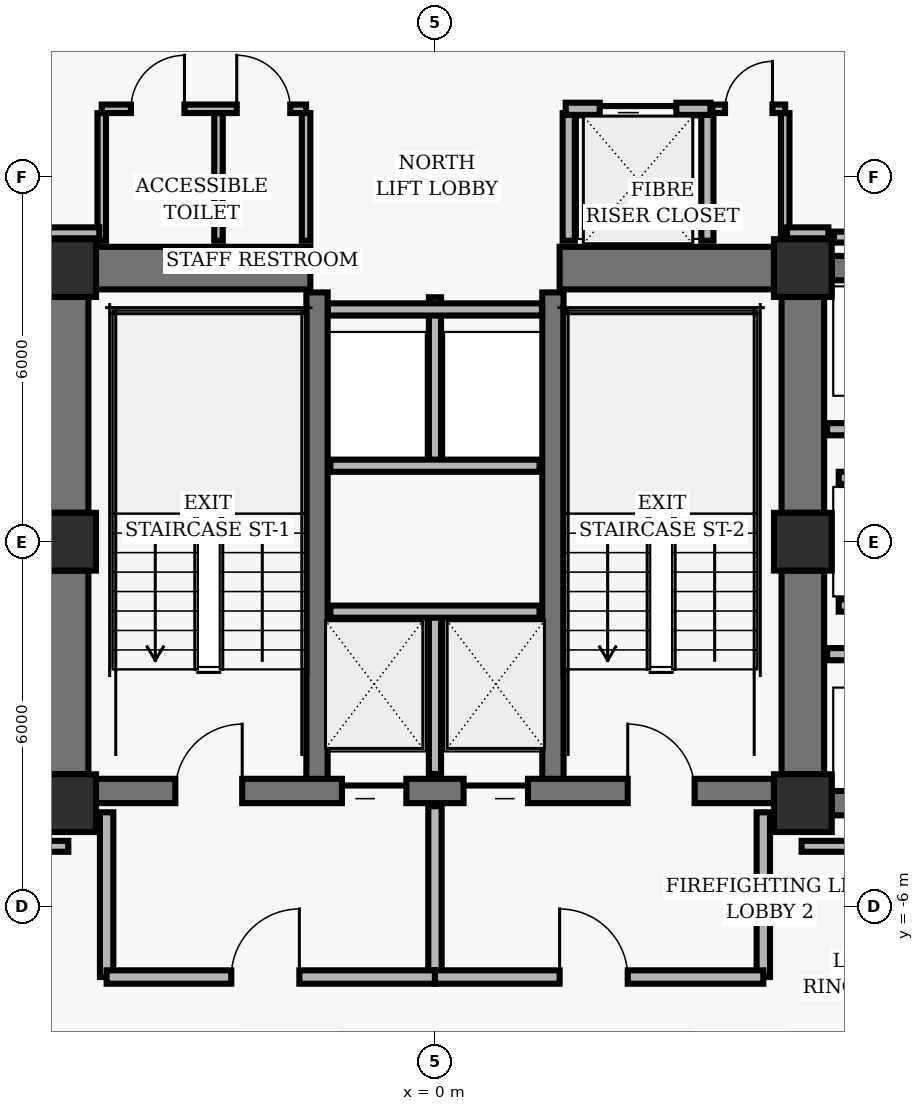
"""IFC4 building model, lengths in metres.
Left out: names, types, materials, properties, quantities, classifications, styles, units other than length and angle.
Written with IfcOpenShell. Run it as: python <this file> out.ifc"""

import sys

from ifc_helpers import new_model, si_unit, direction, frame, frame_2d, origin, origin_2d, place, context, subcontext, project, spatial, rectangle, hollow_rectangle, extrude, element, fill, save


model = new_model("IFC4")
c1 = context("Model", 3, precision=1e-05, world=origin(), true_north=direction((0.0, 1.0)))
c2 = subcontext(c1, "Body", "Model", "MODEL_VIEW")
j1 = project(units=[si_unit("LENGTHUNIT", "METRE"), si_unit("PLANEANGLEUNIT", "RADIAN")], contexts=[c1])
p1 = place(None, origin())
s1 = spatial("IfcSite", under=j1, at=p1, CompositionType="ELEMENT")
p2 = place(p1, origin())
s2 = spatial("IfcBuilding", under=s1, at=p2, CompositionType="ELEMENT")
p3 = place(p2, frame((0.0, 0.0, 94.72)))
s3 = spatial("IfcBuildingStorey", under=s2, at=p3, CompositionType="ELEMENT", Elevation=94.72)
for number, where, z_axis, x_axis in (
    (1, (-6.05, 4.5, 0.0), (0.0, 0.0, 1.0), (1.0, 0.0, 0.0)),
    (2, (6.05, 4.5, 0.0), (0.0, 0.0, 1.0), (1.0, 0.0, 0.0)),
    (3, (-6.05, 0.0, 0.0), (0.0, 0.0, 1.0), (1.0, 0.0, 0.0)),
    (4, (6.05, 0.0, 0.0), (0.0, 0.0, 1.0), (1.0, 0.0, 0.0)),
    (5, (-6.05, -4.3, 0.0), (0.0, 0.0, 1.0), (1.0, 0.0, 0.0)),
    (6, (6.05, -4.3, 0.0), (0.0, 0.0, 1.0), (1.0, 0.0, 0.0)),
):
    element("IfcColumn", number, at=place(p3, frame(where, z_axis=z_axis, x_axis=x_axis)), inside=s3, PredefinedType="COLUMN", context=c2, shape_type="SweptSolid", body=[
        extrude(hollow_rectangle(XDim=0.95, YDim=0.95, WallThickness=0.06, InnerFilletRadius=0.02, OuterFilletRadius=0.04, at=origin_2d()), origin(), (0.0, 0.0, 1.0), 3.04),
    ])
p4 = place(p3, frame((-6.05, 0.475, 0.0), z_axis=(0.0, 0.0, 1.0), x_axis=(0.0, 1.0, 0.0)))
e7 = element("IfcWall", 7, at=p4, inside=s3, PredefinedType="SHEAR", context=c2, shape_type="SweptSolid", body=[
    extrude(rectangle(XDim=3.55, YDim=0.7, at=frame_2d((1.775, 0.0))), origin(), (0.0, 0.0, 1.0), 2.788),
])
p5 = place(p3, frame((-6.05, -3.825, 0.0), z_axis=(0.0, 0.0, 1.0), x_axis=(0.0, 1.0, 0.0)))
e8 = element("IfcWall", 8, at=p5, inside=s3, PredefinedType="SHEAR", context=c2, shape_type="SweptSolid", body=[
    extrude(rectangle(XDim=3.35, YDim=0.7, at=frame_2d((1.675, 0.0))), origin(), (0.0, 0.0, 1.0), 2.788),
])
p6 = place(p3, frame((6.05, 0.475, 0.0), z_axis=(0.0, 0.0, 1.0), x_axis=(0.0, 1.0, 0.0)))
e9 = element("IfcWall", 9, at=p6, inside=s3, PredefinedType="SHEAR", context=c2, shape_type="SweptSolid", body=[
    extrude(rectangle(XDim=3.55, YDim=0.7, at=frame_2d((1.775, 0.0))), origin(), (0.0, 0.0, 1.0), 2.788),
])
p7 = place(p3, frame((6.05, -3.825, 0.0), z_axis=(0.0, 0.0, 1.0), x_axis=(0.0, 1.0, 0.0)))
e10 = element("IfcWall", 10, at=p7, inside=s3, PredefinedType="SHEAR", context=c2, shape_type="SweptSolid", body=[
    extrude(rectangle(XDim=3.35, YDim=0.7, at=frame_2d((1.675, 0.0))), origin(), (0.0, 0.0, 1.0), 2.788),
])
for number, where, z_axis, x_axis in (
    (11, (-1.94, -4.1, 0.0), (0.0, 0.0, 1.0), (0.0, 1.0, 0.0)),
    (12, (1.94, -4.1, 0.0), (0.0, 0.0, 1.0), (0.0, 1.0, 0.0)),
):
    element("IfcWall", number, at=place(p3, frame(where, z_axis=z_axis, x_axis=x_axis)), inside=s3, PredefinedType="SHEAR", context=c2, shape_type="SweptSolid", body=[
        extrude(rectangle(XDim=8.2, YDim=0.35, at=frame_2d((4.1, 0.0))), origin(), (0.0, 0.0, 1.0), 2.788),
    ])
p8 = place(p3, frame((-5.575, -4.1, 0.0), z_axis=(0.0, 0.0, 1.0), x_axis=(1.0, 0.0, 0.0)))
e13 = element("IfcWall", 13, at=p8, inside=s3, PredefinedType="SHEAR", context=c2, shape_type="SweptSolid", body=[
    extrude(rectangle(XDim=11.15, YDim=0.4, at=frame_2d((5.575, 0.0))), origin(), (0.0, 0.0, 1.0), 2.788),
])
p9 = place(p8, frame((1.305, 0.0, 0.0)))
e14 = element("IfcOpeningElement", 14, at=p9, cuts=e13, PredefinedType="OPENING", context=c2, shape_type="SweptSolid", body=[
    extrude(rectangle(XDim=1.1, YDim=2.04, at=frame_2d((0.55, 1.02))), frame((0.0, 0.21, 0.0), z_axis=(0.0, -1.0, 0.0), x_axis=(1.0, 0.0, 0.0)), (0.0, 0.0, 1.0), 0.42),
])
p10 = place(p8, frame((8.745, 0.0, 0.0)))
e15 = element("IfcOpeningElement", 15, at=p10, cuts=e13, PredefinedType="OPENING", context=c2, shape_type="SweptSolid", body=[
    extrude(rectangle(XDim=1.1, YDim=2.04, at=frame_2d((0.55, 1.02))), frame((0.0, 0.21, 0.0), z_axis=(0.0, -1.0, 0.0), x_axis=(1.0, 0.0, 0.0)), (0.0, 0.0, 1.0), 0.42),
])
p11 = place(p8, frame((4.045, 0.0, 0.0)))
e16 = element("IfcOpeningElement", 16, at=p11, cuts=e13, PredefinedType="OPENING", context=c2, shape_type="SweptSolid", body=[
    extrude(rectangle(XDim=1.06, YDim=2.04, at=frame_2d((0.53, 1.02))), frame((0.0, 0.21, 0.0), z_axis=(0.0, -1.0, 0.0), x_axis=(1.0, 0.0, 0.0)), (0.0, 0.0, 1.0), 0.42),
])
p12 = place(p8, frame((6.045, 0.0, 0.0)))
e17 = element("IfcOpeningElement", 17, at=p12, cuts=e13, PredefinedType="OPENING", context=c2, shape_type="SweptSolid", body=[
    extrude(rectangle(XDim=1.06, YDim=2.04, at=frame_2d((0.53, 1.02))), frame((0.0, 0.21, 0.0), z_axis=(0.0, -1.0, 0.0), x_axis=(1.0, 0.0, 0.0)), (0.0, 0.0, 1.0), 0.42),
])
for number, where, z_axis, x_axis in (
    (18, (-5.575, 4.5, 0.0), (0.0, 0.0, 1.0), (1.0, 0.0, 0.0)),
    (19, (2.05, 4.5, 0.0), (0.0, 0.0, 1.0), (1.0, 0.0, 0.0)),
):
    element("IfcWall", number, at=place(p3, frame(where, z_axis=z_axis, x_axis=x_axis)), inside=s3, PredefinedType="SHEAR", context=c2, shape_type="SweptSolid", body=[
        extrude(rectangle(XDim=3.525, YDim=0.7, at=frame_2d((1.762, 0.0))), origin(), (0.0, 0.0, 1.0), 2.788),
    ])
for number, where, z_axis, x_axis in (
    (20, (6.525, 4.5, 0.0), (0.0, 0.0, 1.0), (1.0, 0.0, 0.0)),
    (21, (6.525, -4.3, 0.0), (0.0, 0.0, 1.0), (1.0, 0.0, 0.0)),
):
    element("IfcWall", number, at=place(p3, frame(where, z_axis=z_axis, x_axis=x_axis)), inside=s3, PredefinedType="SHEAR", context=c2, shape_type="SweptSolid", body=[
        extrude(rectangle(XDim=1.95, YDim=0.4, at=frame_2d((0.975, 0.0))), origin(), (0.0, 0.0, 1.0), 2.788),
    ])
p13 = place(p3, frame((0.0, -3.82, 0.0), z_axis=(0.0, 0.0, 1.0), x_axis=(0.0, 1.0, 0.0)))
e22 = element("IfcWall", 22, at=p13, inside=s3, PredefinedType="PARTITIONING", context=c2, shape_type="SweptSolid", body=[
    extrude(rectangle(XDim=2.67, YDim=0.2, at=frame_2d((1.335, 0.0))), origin(), (0.0, 0.0, 1.0), 2.763),
])
p14 = place(p3, frame((-1.72, -1.15, 0.0), z_axis=(0.0, 0.0, 1.0), x_axis=(1.0, 0.0, 0.0)))
e23 = element("IfcWall", 23, at=p14, inside=s3, PredefinedType="PARTITIONING", context=c2, shape_type="SweptSolid", body=[
    extrude(rectangle(XDim=3.44, YDim=0.2, at=frame_2d((1.72, 0.0))), origin(), (0.0, 0.0, 1.0), 2.763),
])
for number, where, z_axis, x_axis in (
    (24, (-5.4, -7.16, 0.0), (0.0, 0.0, 1.0), (0.0, 1.0, 0.0)),
    (25, (5.4, -7.16, 0.0), (0.0, 0.0, 1.0), (0.0, 1.0, 0.0)),
):
    element("IfcWall", number, at=place(p3, frame(where, z_axis=z_axis, x_axis=x_axis)), inside=s3, PredefinedType="PARTITIONING", context=c2, shape_type="SweptSolid", body=[
        extrude(rectangle(XDim=2.71, YDim=0.22, at=frame_2d((1.355, 0.0))), origin(), (0.0, 0.0, 1.0), 2.763),
    ])
p15 = place(p3, frame((0.0, -7.16, 0.0), z_axis=(0.0, 0.0, 1.0), x_axis=(0.0, 1.0, 0.0)))
e26 = element("IfcWall", 26, at=p15, inside=s3, PredefinedType="PARTITIONING", context=c2, shape_type="SweptSolid", body=[
    extrude(rectangle(XDim=2.81, YDim=0.22, at=frame_2d((1.405, 0.0))), origin(), (0.0, 0.0, 1.0), 2.763),
])
p16 = place(p3, frame((-5.4, -7.16, 0.0), z_axis=(0.0, 0.0, 1.0), x_axis=(1.0, 0.0, 0.0)))
e27 = element("IfcWall", 27, at=p16, inside=s3, PredefinedType="PARTITIONING", context=c2, shape_type="SweptSolid", body=[
    extrude(rectangle(XDim=5.4, YDim=0.22, at=frame_2d((2.7, 0.0))), origin(), (0.0, 0.0, 1.0), 2.763),
])
p17 = place(p16, frame((2.05, 0.0, 0.0)))
e28 = element("IfcOpeningElement", 28, at=p17, cuts=e27, PredefinedType="OPENING", context=c2, shape_type="SweptSolid", body=[
    extrude(rectangle(XDim=1.12, YDim=2.02, at=frame_2d((0.56, 1.01))), frame((0.0, 0.12, 0.0), z_axis=(0.0, -1.0, 0.0), x_axis=(1.0, 0.0, 0.0)), (0.0, 0.0, 1.0), 0.24),
])
p18 = place(p3, frame((0.0, -7.16, 0.0), z_axis=(0.0, 0.0, 1.0), x_axis=(1.0, 0.0, 0.0)))
e29 = element("IfcWall", 29, at=p18, inside=s3, PredefinedType="PARTITIONING", context=c2, shape_type="SweptSolid", body=[
    extrude(rectangle(XDim=5.4, YDim=0.22, at=frame_2d((2.7, 0.0))), origin(), (0.0, 0.0, 1.0), 2.763),
])
p19 = place(p18, frame((2.05, 0.0, 0.0)))
e30 = element("IfcOpeningElement", 30, at=p19, cuts=e29, PredefinedType="OPENING", context=c2, shape_type="SweptSolid", body=[
    extrude(rectangle(XDim=1.12, YDim=2.02, at=frame_2d((0.56, 1.01))), frame((0.0, 0.12, 0.0), z_axis=(0.0, -1.0, 0.0), x_axis=(1.0, 0.0, 0.0)), (0.0, 0.0, 1.0), 0.24),
])
p20 = place(p3, frame((0.0, 1.25, 0.0), z_axis=(0.0, 0.0, 1.0), x_axis=(0.0, 1.0, 0.0)))
e31 = element("IfcWall", 31, at=p20, inside=s3, PredefinedType="PARTITIONING", context=c2, shape_type="SweptSolid", body=[
    extrude(rectangle(XDim=2.77, YDim=0.2, at=frame_2d((1.385, 0.0))), origin(), (0.0, 0.0, 1.0), 2.763),
])
p21 = place(p3, frame((-1.72, 1.25, 0.0), z_axis=(0.0, 0.0, 1.0), x_axis=(1.0, 0.0, 0.0)))
e32 = element("IfcWall", 32, at=p21, inside=s3, PredefinedType="PARTITIONING", context=c2, shape_type="SweptSolid", body=[
    extrude(rectangle(XDim=3.44, YDim=0.2, at=frame_2d((1.72, 0.0))), origin(), (0.0, 0.0, 1.0), 2.763),
])
p22 = place(p3, frame((-1.76, 3.82, 0.0), z_axis=(0.0, 0.0, 1.0), x_axis=(1.0, 0.0, 0.0)))
e33 = element("IfcWall", 33, at=p22, inside=s3, PredefinedType="PARTITIONING", context=c2, shape_type="SweptSolid", body=[
    extrude(rectangle(XDim=3.52, YDim=0.2, at=frame_2d((1.76, 0.0))), origin(), (0.0, 0.0, 1.0), 2.763),
])
for number, where, z_axis, x_axis in (
    (34, (2.2, 4.95, 0.0), (0.0, 0.0, 1.0), (0.0, 1.0, 0.0)),
    (35, (4.48, 4.95, 0.0), (0.0, 0.0, 1.0), (0.0, 1.0, 0.0)),
):
    element("IfcWall", number, at=place(p3, frame(where, z_axis=z_axis, x_axis=x_axis)), inside=s3, PredefinedType="PARTITIONING", context=c2, shape_type="SweptSolid", body=[
        extrude(rectangle(XDim=2.1, YDim=0.2, at=frame_2d((1.05, 0.0))), origin(), (0.0, 0.0, 1.0), 2.763),
    ])
p23 = place(p3, frame((2.15, 7.12, 0.0), z_axis=(0.0, 0.0, 1.0), x_axis=(1.0, 0.0, 0.0)))
e36 = element("IfcWall", 36, at=p23, inside=s3, PredefinedType="PARTITIONING", context=c2, shape_type="SweptSolid", body=[
    extrude(rectangle(XDim=2.38, YDim=0.2, at=frame_2d((1.19, 0.0))), origin(), (0.0, 0.0, 1.0), 2.763),
])
p24 = place(p23, frame((0.56, 0.0, 0.0)))
e37 = element("IfcOpeningElement", 37, at=p24, cuts=e36, PredefinedType="OPENING", context=c2, shape_type="SweptSolid", body=[
    extrude(rectangle(XDim=1.26, YDim=2.06, at=frame_2d((0.63, 1.03))), frame((0.0, 0.11, 0.0), z_axis=(0.0, -1.0, 0.0), x_axis=(1.0, 0.0, 0.0)), (0.0, 0.0, 1.0), 0.22),
])
for number, where, z_axis, x_axis in (
    (38, (-5.48, 4.95, 0.0), (0.0, 0.0, 1.0), (0.0, 1.0, 0.0)),
    (39, (-3.56, 4.95, 0.0), (0.0, 0.0, 1.0), (0.0, 1.0, 0.0)),
    (40, (-2.12, 4.95, 0.0), (0.0, 0.0, 1.0), (0.0, 1.0, 0.0)),
):
    element("IfcWall", number, at=place(p3, frame(where, z_axis=z_axis, x_axis=x_axis)), inside=s3, PredefinedType="PARTITIONING", context=c2, shape_type="SweptSolid", body=[
        extrude(rectangle(XDim=2.1, YDim=0.14, at=frame_2d((1.05, 0.0))), origin(), (0.0, 0.0, 1.0), 2.763),
    ])
p25 = place(p3, frame((-5.48, 7.12, 0.0), z_axis=(0.0, 0.0, 1.0), x_axis=(1.0, 0.0, 0.0)))
e41 = element("IfcWall", 41, at=p25, inside=s3, PredefinedType="PARTITIONING", context=c2, shape_type="SweptSolid", body=[
    extrude(rectangle(XDim=3.36, YDim=0.14, at=frame_2d((1.68, 0.0))), origin(), (0.0, 0.0, 1.0), 2.763),
])
p26 = place(p25, frame((0.48, 0.0, 0.0)))
e42 = element("IfcOpeningElement", 42, at=p26, cuts=e41, PredefinedType="OPENING", context=c2, shape_type="SweptSolid", body=[
    extrude(rectangle(XDim=0.88, YDim=2.02, at=frame_2d((0.44, 1.01))), frame((0.0, 0.08, 0.0), z_axis=(0.0, -1.0, 0.0), x_axis=(1.0, 0.0, 0.0)), (0.0, 0.0, 1.0), 0.16),
])
p27 = place(p25, frame((2.22, 0.0, 0.0)))
e43 = element("IfcOpeningElement", 43, at=p27, cuts=e41, PredefinedType="OPENING", context=c2, shape_type="SweptSolid", body=[
    extrude(rectangle(XDim=0.88, YDim=2.02, at=frame_2d((0.44, 1.01))), frame((0.0, 0.08, 0.0), z_axis=(0.0, -1.0, 0.0), x_axis=(1.0, 0.0, 0.0)), (0.0, 0.0, 1.0), 0.16),
])
p28 = place(p3, frame((5.76, 4.95, 0.0), z_axis=(0.0, 0.0, 1.0), x_axis=(0.0, 1.0, 0.0)))
e44 = element("IfcWall", 44, at=p28, inside=s3, PredefinedType="PARTITIONING", context=c2, shape_type="SweptSolid", body=[
    extrude(rectangle(XDim=2.1, YDim=0.14, at=frame_2d((1.05, 0.0))), origin(), (0.0, 0.0, 1.0), 2.763),
])
p29 = place(p3, frame((4.56, 7.12, 0.0), z_axis=(0.0, 0.0, 1.0), x_axis=(1.0, 0.0, 0.0)))
e45 = element("IfcWall", 45, at=p29, inside=s3, PredefinedType="PARTITIONING", context=c2, shape_type="SweptSolid", body=[
    extrude(rectangle(XDim=1.2, YDim=0.14, at=frame_2d((0.6, 0.0))), origin(), (0.0, 0.0, 1.0), 2.763),
])
p30 = place(p29, frame((0.21, 0.0, 0.0)))
e46 = element("IfcOpeningElement", 46, at=p30, cuts=e45, PredefinedType="OPENING", context=c2, shape_type="SweptSolid", body=[
    extrude(rectangle(XDim=0.78, YDim=2.01, at=frame_2d((0.39, 1.005))), frame((0.0, 0.08, 0.0), z_axis=(0.0, -1.0, 0.0), x_axis=(1.0, 0.0, 0.0)), (0.0, 0.0, 1.0), 0.16),
])
for number, where, z_axis, x_axis in (
    (47, (6.45, -1.85, 0.0), (0.0, 0.0, 1.0), (1.0, 0.0, 0.0)),
    (48, (6.45, 1.85, 0.0), (0.0, 0.0, 1.0), (1.0, 0.0, 0.0)),
):
    element("IfcWall", number, at=place(p3, frame(where, z_axis=z_axis, x_axis=x_axis)), inside=s3, PredefinedType="PARTITIONING", context=c2, shape_type="SweptSolid", body=[
        extrude(rectangle(XDim=2.1, YDim=0.2, at=frame_2d((1.05, 0.0))), origin(), (0.0, 0.0, 1.0), 2.763),
    ])
for number, where, z_axis, x_axis in (
    (49, (6.64, -1.05, 0.0), (0.0, 0.0, 1.0), (1.0, 0.0, 0.0)),
    (50, (6.64, 1.05, 0.0), (0.0, 0.0, 1.0), (1.0, 0.0, 0.0)),
):
    element("IfcWall", number, at=place(p3, frame(where, z_axis=z_axis, x_axis=x_axis)), inside=s3, PredefinedType="PARTITIONING", context=c2, shape_type="SweptSolid", body=[
        extrude(rectangle(XDim=1.91, YDim=0.2, at=frame_2d((0.955, 0.0))), origin(), (0.0, 0.0, 1.0), 2.763),
    ])
for number, where, z_axis, x_axis in (
    (51, (-9.37, -5.01, 0.0), (0.0, 0.0, 1.0), (1.0, 0.0, 0.0)),
    (52, (6.03, -5.01, 0.0), (0.0, 0.0, 1.0), (1.0, 0.0, 0.0)),
):
    element("IfcWall", number, at=place(p3, frame(where, z_axis=z_axis, x_axis=x_axis)), inside=s3, PredefinedType="PARTITIONING", context=c2, shape_type="SweptSolid", body=[
        extrude(rectangle(XDim=3.34, YDim=0.18, at=frame_2d((1.67, 0.0))), origin(), (0.0, 0.0, 1.0), 2.763),
    ])
p31 = place(p3, frame((9.37, 5.01, 0.0), z_axis=(0.0, 0.0, 1.0), x_axis=(-1.0, 0.0, 0.0)))
e53 = element("IfcWall", 53, at=p31, inside=s3, PredefinedType="PARTITIONING", context=c2, shape_type="SweptSolid", body=[
    extrude(rectangle(XDim=2.808, YDim=0.18, at=frame_2d((1.404, 0.0))), origin(), (0.0, 0.0, 1.0), 2.763),
])
p32 = place(p3, frame((6.47, 5.08, 0.0), z_axis=(0.0, 0.0, 1.0), x_axis=(-1.0, 0.0, 0.0)))
e54 = element("IfcWall", 54, at=p32, inside=s3, PredefinedType="PARTITIONING", context=c2, shape_type="SweptSolid", body=[
    extrude(rectangle(XDim=0.68, YDim=0.18, at=frame_2d((0.34, 0.0))), origin(), (0.0, 0.0, 1.0), 2.763),
])
p33 = place(p3, frame((-5.52, 5.08, 0.0), z_axis=(0.0, 0.0, 1.0), x_axis=(-1.0, 0.0, 0.0)))
e55 = element("IfcWall", 55, at=p33, inside=s3, PredefinedType="PARTITIONING", context=c2, shape_type="SweptSolid", body=[
    extrude(rectangle(XDim=0.95, YDim=0.18, at=frame_2d((0.475, 0.0))), origin(), (0.0, 0.0, 1.0), 2.763),
])
p34 = place(p9, origin())
e56 = element("IfcDoor", 56, at=p34, inside=s3, OperationType="SINGLE_SWING_RIGHT", PredefinedType="DOOR", context=c2, shape_type="SweptSolid", body=[
    extrude(rectangle(XDim=1.1, YDim=2.04, at=frame_2d((0.55, 1.02))), frame((0.0, 0.025, 0.0), z_axis=(0.0, -1.0, 0.0), x_axis=(1.0, 0.0, 0.0)), (0.0, 0.0, 1.0), 0.05),
])
fill(e14, e56)
p35 = place(p10, origin())
e57 = element("IfcDoor", 57, at=p35, inside=s3, OperationType="SINGLE_SWING_LEFT", PredefinedType="DOOR", context=c2, shape_type="SweptSolid", body=[
    extrude(rectangle(XDim=1.1, YDim=2.04, at=frame_2d((0.55, 1.02))), frame((0.0, 0.025, 0.0), z_axis=(0.0, -1.0, 0.0), x_axis=(1.0, 0.0, 0.0)), (0.0, 0.0, 1.0), 0.05),
])
fill(e15, e57)
p36 = place(p11, origin())
e58 = element("IfcDoor", 58, at=p36, inside=s3, OperationType="SLIDING_TO_LEFT", PredefinedType="DOOR", context=c2, shape_type="SweptSolid", body=[
    extrude(rectangle(XDim=1.06, YDim=2.04, at=frame_2d((0.53, 1.02))), frame((0.0, 0.025, 0.0), z_axis=(0.0, -1.0, 0.0), x_axis=(1.0, 0.0, 0.0)), (0.0, 0.0, 1.0), 0.05),
])
fill(e16, e58)
p37 = place(p12, origin())
e59 = element("IfcDoor", 59, at=p37, inside=s3, OperationType="SLIDING_TO_RIGHT", PredefinedType="DOOR", context=c2, shape_type="SweptSolid", body=[
    extrude(rectangle(XDim=1.06, YDim=2.04, at=frame_2d((0.53, 1.02))), frame((0.0, 0.025, 0.0), z_axis=(0.0, -1.0, 0.0), x_axis=(1.0, 0.0, 0.0)), (0.0, 0.0, 1.0), 0.05),
])
fill(e17, e59)
p38 = place(p17, origin())
e60 = element("IfcDoor", 60, at=p38, inside=s3, OperationType="SINGLE_SWING_RIGHT", PredefinedType="DOOR", context=c2, shape_type="SweptSolid", body=[
    extrude(rectangle(XDim=1.12, YDim=2.02, at=frame_2d((0.56, 1.01))), frame((0.0, 0.025, 0.0), z_axis=(0.0, -1.0, 0.0), x_axis=(1.0, 0.0, 0.0)), (0.0, 0.0, 1.0), 0.05),
])
fill(e28, e60)
p39 = place(p19, origin())
e61 = element("IfcDoor", 61, at=p39, inside=s3, OperationType="SINGLE_SWING_LEFT", PredefinedType="DOOR", context=c2, shape_type="SweptSolid", body=[
    extrude(rectangle(XDim=1.12, YDim=2.02, at=frame_2d((0.56, 1.01))), frame((0.0, 0.025, 0.0), z_axis=(0.0, -1.0, 0.0), x_axis=(1.0, 0.0, 0.0)), (0.0, 0.0, 1.0), 0.05),
])
fill(e30, e61)
p40 = place(p24, origin())
e62 = element("IfcDoor", 62, at=p40, inside=s3, OperationType="SLIDING_TO_LEFT", PredefinedType="DOOR", context=c2, shape_type="SweptSolid", body=[
    extrude(rectangle(XDim=1.26, YDim=2.06, at=frame_2d((0.63, 1.03))), frame((0.0, 0.025, 0.0), z_axis=(0.0, -1.0, 0.0), x_axis=(1.0, 0.0, 0.0)), (0.0, 0.0, 1.0), 0.05),
])
fill(e37, e62)
p41 = place(p26, origin())
e63 = element("IfcDoor", 63, at=p41, inside=s3, OperationType="SINGLE_SWING_RIGHT", PredefinedType="DOOR", context=c2, shape_type="SweptSolid", body=[
    extrude(rectangle(XDim=0.88, YDim=2.02, at=frame_2d((0.44, 1.01))), frame((0.0, 0.025, 0.0), z_axis=(0.0, -1.0, 0.0), x_axis=(1.0, 0.0, 0.0)), (0.0, 0.0, 1.0), 0.05),
])
fill(e42, e63)
p42 = place(p27, origin())
e64 = element("IfcDoor", 64, at=p42, inside=s3, OperationType="SINGLE_SWING_LEFT", PredefinedType="DOOR", context=c2, shape_type="SweptSolid", body=[
    extrude(rectangle(XDim=0.88, YDim=2.02, at=frame_2d((0.44, 1.01))), frame((0.0, 0.025, 0.0), z_axis=(0.0, -1.0, 0.0), x_axis=(1.0, 0.0, 0.0)), (0.0, 0.0, 1.0), 0.05),
])
fill(e43, e64)
p43 = place(p30, origin())
e65 = element("IfcDoor", 65, at=p43, inside=s3, OperationType="SINGLE_SWING_RIGHT", PredefinedType="DOOR", context=c2, shape_type="SweptSolid", body=[
    extrude(rectangle(XDim=0.78, YDim=2.01, at=frame_2d((0.39, 1.005))), frame((0.0, 0.025, 0.0), z_axis=(0.0, -1.0, 0.0), x_axis=(1.0, 0.0, 0.0)), (0.0, 0.0, 1.0), 0.05),
])
fill(e46, e65)
save(model, sys.argv[1])
